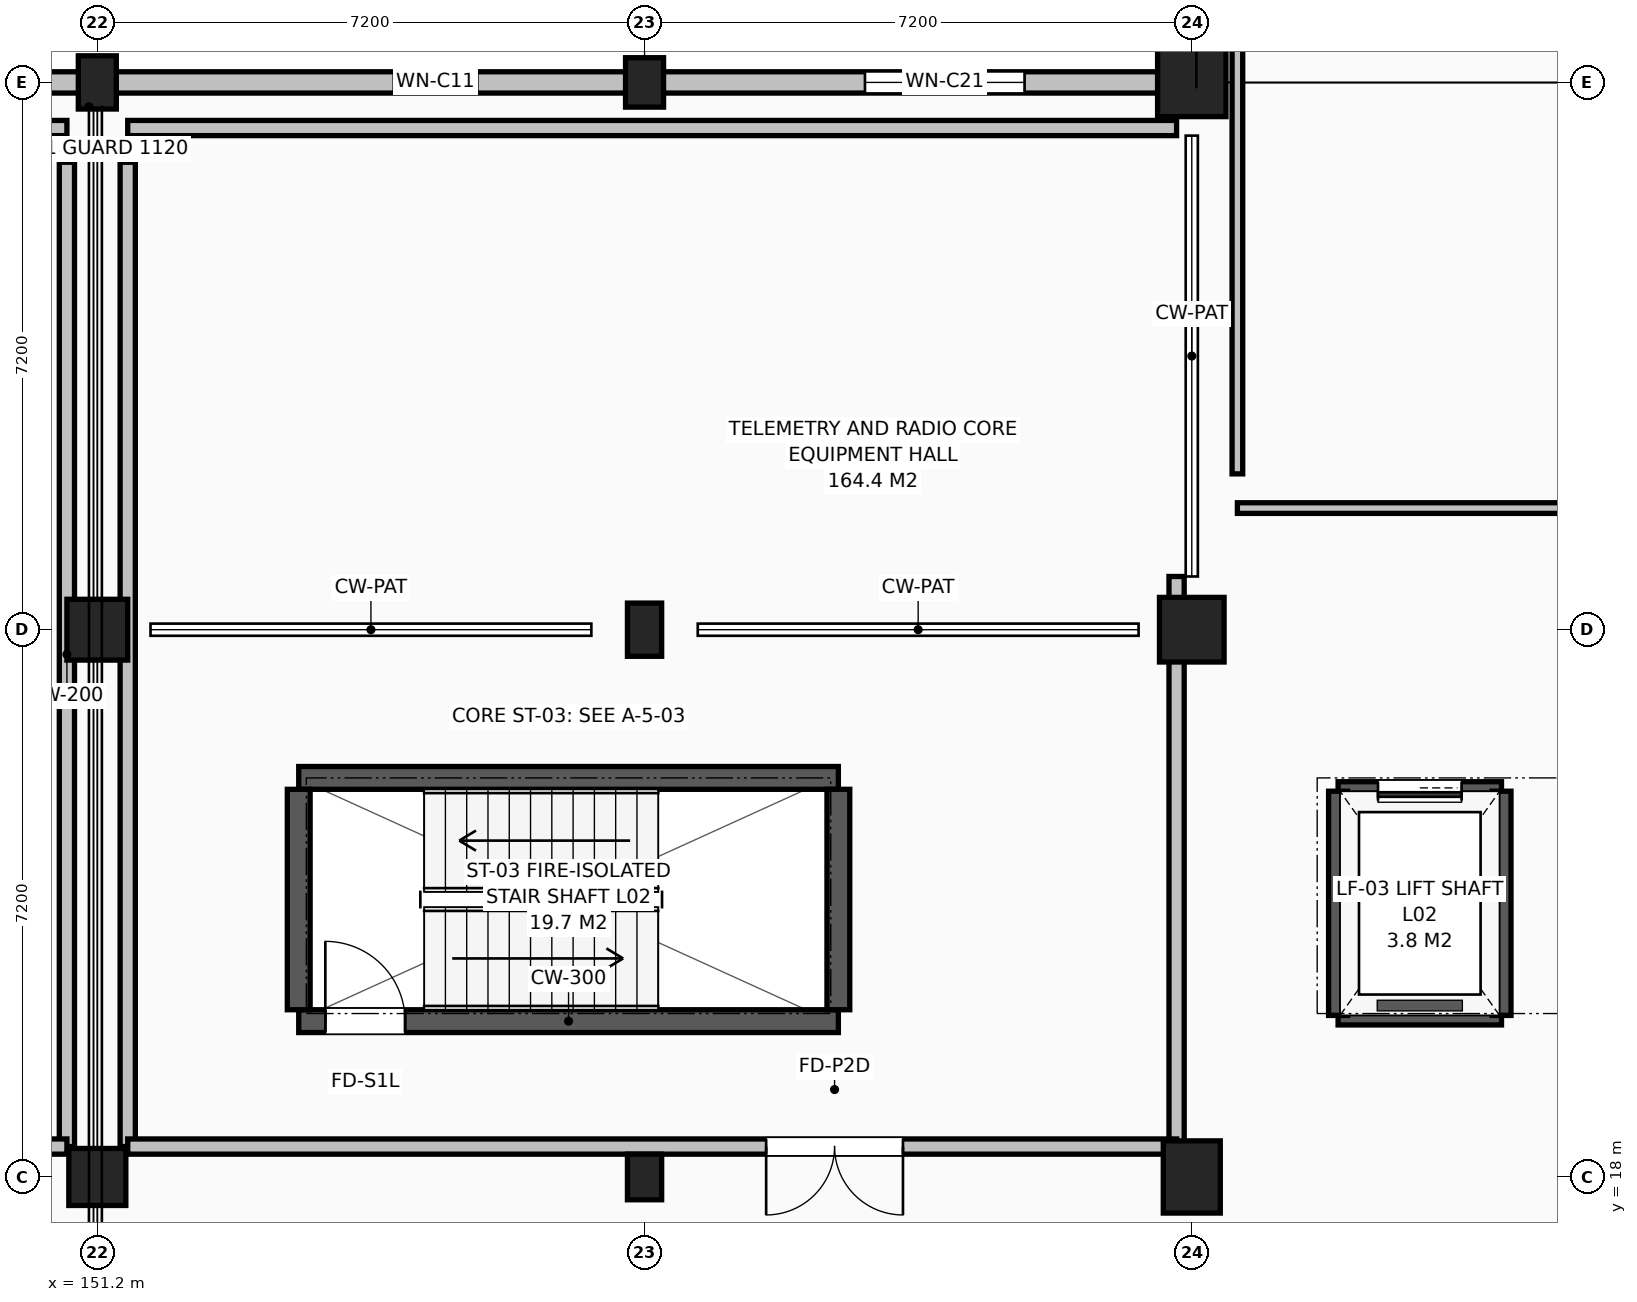
"""IFC4 building model, lengths in metres.
Left out: names, types, materials, properties, quantities, classifications, styles, units other than length and angle.
Written with IfcOpenShell. Run it as: python <this file> out.ifc"""

import sys

from ifc_helpers import new_model, si_unit, direction, frame, frame_2d, origin, origin_2d, place, context, subcontext, project, spatial, rectangle, extrude, element, fill, save


model = new_model("IFC4")
c1 = context("Model", 3, precision=1e-05, world=origin(), true_north=direction((0.0, 1.0)))
c2 = subcontext(c1, "Body", "Model", "MODEL_VIEW")
j1 = project(units=[si_unit("LENGTHUNIT", "METRE"), si_unit("PLANEANGLEUNIT", "RADIAN")], contexts=[c1])
p1 = place(None, origin())
s1 = spatial("IfcSite", under=j1, at=p1, CompositionType="ELEMENT")
p2 = place(p1, origin())
s2 = spatial("IfcBuilding", under=s1, at=p2, CompositionType="ELEMENT")
p3 = place(p2, frame((0.0, 0.0, 9.0)))
s3 = spatial("IfcBuildingStorey", under=s2, at=p3, CompositionType="ELEMENT", Elevation=9.0)
p4 = place(p3, frame((151.2, 18.0, 0.0), z_axis=(0.0, 0.0, 1.0), x_axis=(1.0, 0.0, 0.0)))
e1 = element("IfcColumn", 1, at=p4, inside=s3, PredefinedType="COLUMN", context=c2, shape_type="SweptSolid", body=[
    extrude(rectangle(XDim=0.75, YDim=0.75, at=origin_2d()), origin(), (0.0, 0.0, 1.0), 4.2),
])
p5 = place(p3, frame((151.2, 25.2, 0.0), z_axis=(0.0, 0.0, 1.0), x_axis=(1.0, 0.0, 0.0)))
e2 = element("IfcColumn", 2, at=p5, inside=s3, PredefinedType="COLUMN", context=c2, shape_type="SweptSolid", body=[
    extrude(rectangle(XDim=0.8, YDim=0.8, at=origin_2d()), origin(), (0.0, 0.0, 1.0), 4.2),
])
p6 = place(p3, frame((151.2, 32.4, 0.0), z_axis=(0.0, 0.0, 1.0), x_axis=(1.0, 0.0, 0.0)))
e3 = element("IfcColumn", 3, at=p6, inside=s3, PredefinedType="COLUMN", context=c2, shape_type="SweptSolid", body=[
    extrude(rectangle(XDim=0.5, YDim=0.7, at=origin_2d()), origin(), (0.0, 0.0, 1.0), 4.2),
])
p7 = place(p3, frame((158.4, 18.0, 0.0), z_axis=(0.0, 0.0, 1.0), x_axis=(1.0, 0.0, 0.0)))
e4 = element("IfcColumn", 4, at=p7, inside=s3, PredefinedType="COLUMN", context=c2, shape_type="SweptSolid", body=[
    extrude(rectangle(XDim=0.45, YDim=0.6, at=origin_2d()), origin(), (0.0, 0.0, 1.0), 4.2),
])
p8 = place(p3, frame((158.4, 25.2, 0.0), z_axis=(0.0, 0.0, 1.0), x_axis=(1.0, 0.0, 0.0)))
e5 = element("IfcColumn", 5, at=p8, inside=s3, PredefinedType="COLUMN", context=c2, shape_type="SweptSolid", body=[
    extrude(rectangle(XDim=0.45, YDim=0.7, at=origin_2d()), origin(), (0.0, 0.0, 1.0), 4.2),
])
p9 = place(p3, frame((158.4, 32.4, 0.0), z_axis=(0.0, 0.0, 1.0), x_axis=(1.0, 0.0, 0.0)))
e6 = element("IfcColumn", 6, at=p9, inside=s3, PredefinedType="COLUMN", context=c2, shape_type="SweptSolid", body=[
    extrude(rectangle(XDim=0.5, YDim=0.65, at=origin_2d()), origin(), (0.0, 0.0, 1.0), 4.2),
])
p10 = place(p3, frame((165.6, 18.0, 0.0), z_axis=(0.0, 0.0, 1.0), x_axis=(1.0, 0.0, 0.0)))
e7 = element("IfcColumn", 7, at=p10, inside=s3, PredefinedType="COLUMN", context=c2, shape_type="SweptSolid", body=[
    extrude(rectangle(XDim=0.75, YDim=0.95, at=origin_2d()), origin(), (0.0, 0.0, 1.0), 4.2),
])
p11 = place(p3, frame((165.6, 25.2, 0.0), z_axis=(0.0, 0.0, 1.0), x_axis=(1.0, 0.0, 0.0)))
e8 = element("IfcColumn", 8, at=p11, inside=s3, PredefinedType="COLUMN", context=c2, shape_type="SweptSolid", body=[
    extrude(rectangle(XDim=0.85, YDim=0.85, at=origin_2d()), origin(), (0.0, 0.0, 1.0), 4.2),
])
p12 = place(p3, frame((165.6, 32.4, 0.0), z_axis=(0.0, 0.0, 1.0), x_axis=(1.0, 0.0, 0.0)))
e9 = element("IfcColumn", 9, at=p12, inside=s3, PredefinedType="COLUMN", context=c2, shape_type="SweptSolid", body=[
    extrude(rectangle(XDim=0.9, YDim=0.9, at=origin_2d()), origin(), (0.0, 0.0, 1.0), 4.2),
])
p13 = place(p3, frame((165.6, 32.4, 0.0), z_axis=(0.0, 0.0, 1.0), x_axis=(-1.0, 0.0, 0.0)))
e10 = element("IfcWall", 10, at=p13, inside=s3, PredefinedType="SOLIDWALL", context=c2, shape_type="SweptSolid", body=[
    extrude(rectangle(XDim=43.2, YDim=0.28, at=frame_2d((21.6, 0.0))), origin(), (0.0, 0.0, 1.0), 3.4),
])
p14 = place(p13, frame((2.2, 0.0, 0.78)))
e11 = element("IfcOpeningElement", 11, at=p14, cuts=e10, PredefinedType="OPENING", context=c2, shape_type="SweptSolid", body=[
    extrude(rectangle(XDim=2.1, YDim=1.8, at=frame_2d((1.05, 0.9))), frame((0.0, 0.15, 0.0), z_axis=(0.0, -1.0, 0.0), x_axis=(1.0, 0.0, 0.0)), (0.0, 0.0, 1.0), 0.3),
])
p15 = place(p13, frame((9.4, 0.0, 0.78)))
e12 = element("IfcOpeningElement", 12, at=p15, cuts=e10, PredefinedType="OPENING", context=c2, shape_type="SweptSolid", body=[
    extrude(rectangle(XDim=1.1, YDim=1.65, at=frame_2d((0.55, 0.825))), frame((0.0, 0.15, 0.0), z_axis=(0.0, -1.0, 0.0), x_axis=(1.0, 0.0, 0.0)), (0.0, 0.0, 1.0), 0.3),
])
p16 = place(p13, frame((16.6, 0.0, 0.78)))
e13 = element("IfcOpeningElement", 13, at=p16, cuts=e10, PredefinedType="OPENING", context=c2, shape_type="SweptSolid", body=[
    extrude(rectangle(XDim=1.25, YDim=1.7, at=frame_2d((0.625, 0.85))), frame((0.0, 0.15, 0.0), z_axis=(0.0, -1.0, 0.0), x_axis=(1.0, 0.0, 0.0)), (0.0, 0.0, 1.0), 0.3),
])
p17 = place(p13, frame((23.8, 0.0, 0.78)))
e14 = element("IfcOpeningElement", 14, at=p17, cuts=e10, PredefinedType="OPENING", context=c2, shape_type="SweptSolid", body=[
    extrude(rectangle(XDim=1.35, YDim=1.75, at=frame_2d((0.675, 0.875))), frame((0.0, 0.15, 0.0), z_axis=(0.0, -1.0, 0.0), x_axis=(1.0, 0.0, 0.0)), (0.0, 0.0, 1.0), 0.3),
])
p18 = place(p13, frame((31.0, 0.0, 0.78)))
e15 = element("IfcOpeningElement", 15, at=p18, cuts=e10, PredefinedType="OPENING", context=c2, shape_type="SweptSolid", body=[
    extrude(rectangle(XDim=1.5, YDim=1.75, at=frame_2d((0.75, 0.875))), frame((0.0, 0.15, 0.0), z_axis=(0.0, -1.0, 0.0), x_axis=(1.0, 0.0, 0.0)), (0.0, 0.0, 1.0), 0.3),
])
p19 = place(p3, frame((153.85, 20.05, 0.0), z_axis=(0.0, 0.0, 1.0), x_axis=(1.0, 0.0, 0.0)))
e16 = element("IfcWall", 16, at=p19, inside=s3, PredefinedType="SHEAR", context=c2, shape_type="SweptSolid", body=[
    extrude(rectangle(XDim=7.1, YDim=0.3, at=frame_2d((3.55, 0.0))), origin(), (0.0, 0.0, 1.0), 3.875),
])
p20 = place(p19, frame((0.35, 0.0, 0.0)))
e17 = element("IfcOpeningElement", 17, at=p20, cuts=e16, PredefinedType="OPENING", context=c2, shape_type="SweptSolid", body=[
    extrude(rectangle(XDim=1.05, YDim=2.15, at=frame_2d((0.525, 1.075))), frame((0.0, 0.16, 0.0), z_axis=(0.0, -1.0, 0.0), x_axis=(1.0, 0.0, 0.0)), (0.0, 0.0, 1.0), 0.32),
])
p21 = place(p3, frame((160.95, 23.25, 0.0), z_axis=(0.0, 0.0, 1.0), x_axis=(-1.0, 0.0, 0.0)))
e18 = element("IfcWall", 18, at=p21, inside=s3, PredefinedType="SHEAR", context=c2, shape_type="SweptSolid", body=[
    extrude(rectangle(XDim=7.1, YDim=0.3, at=frame_2d((3.55, 0.0))), origin(), (0.0, 0.0, 1.0), 3.875),
])
for number, where, z_axis, x_axis in (
    (19, (160.95, 20.2, 0.0), (0.0, 0.0, 1.0), (0.0, 1.0, 0.0)),
    (20, (153.85, 23.1, 0.0), (0.0, 0.0, 1.0), (0.0, -1.0, 0.0)),
):
    element("IfcWall", number, at=place(p3, frame(where, z_axis=z_axis, x_axis=x_axis)), inside=s3, PredefinedType="SHEAR", context=c2, shape_type="SweptSolid", body=[
        extrude(rectangle(XDim=2.9, YDim=0.3, at=frame_2d((1.45, 0.0))), origin(), (0.0, 0.0, 1.0), 3.875),
    ])
p22 = place(p3, frame((167.525, 20.125, 0.0), z_axis=(0.0, 0.0, 1.0), x_axis=(1.0, 0.0, 0.0)))
e21 = element("IfcWall", 21, at=p22, inside=s3, PredefinedType="SHEAR", context=c2, shape_type="SweptSolid", body=[
    extrude(rectangle(XDim=2.15, YDim=0.25, at=frame_2d((1.075, 0.0))), origin(), (0.0, 0.0, 1.0), 3.9),
])
p23 = place(p3, frame((169.675, 23.075, 0.0), z_axis=(0.0, 0.0, 1.0), x_axis=(-1.0, 0.0, 0.0)))
e22 = element("IfcWall", 22, at=p23, inside=s3, PredefinedType="SHEAR", context=c2, shape_type="SweptSolid", body=[
    extrude(rectangle(XDim=2.15, YDim=0.25, at=frame_2d((1.075, 0.0))), origin(), (0.0, 0.0, 1.0), 3.9),
])
p24 = place(p23, frame((0.525, 0.0, 0.0)))
e23 = element("IfcOpeningElement", 23, at=p24, cuts=e22, PredefinedType="OPENING", context=c2, shape_type="SweptSolid", body=[
    extrude(rectangle(XDim=1.1, YDim=2.15, at=frame_2d((0.55, 1.075))), frame((0.0, 0.135, 0.0), z_axis=(0.0, -1.0, 0.0), x_axis=(1.0, 0.0, 0.0)), (0.0, 0.0, 1.0), 0.27),
])
for number, where, z_axis, x_axis in (
    (24, (167.525, 23.075, 0.0), (0.0, 0.0, 1.0), (0.0, -1.0, 0.0)),
    (25, (169.675, 20.125, 0.0), (0.0, 0.0, 1.0), (0.0, 1.0, 0.0)),
):
    element("IfcWall", number, at=place(p3, frame(where, z_axis=z_axis, x_axis=x_axis)), inside=s3, PredefinedType="SHEAR", context=c2, shape_type="SweptSolid", body=[
        extrude(rectangle(XDim=2.95, YDim=0.25, at=frame_2d((1.475, 0.0))), origin(), (0.0, 0.0, 1.0), 3.9),
    ])
p25 = place(p3, frame((130.0, 31.8, 0.0), z_axis=(0.0, 0.0, 1.0), x_axis=(1.0, 0.0, 0.0)))
e26 = element("IfcWall", 26, at=p25, inside=s3, PredefinedType="SOLIDWALL", context=c2, shape_type="SweptSolid", body=[
    extrude(rectangle(XDim=20.8, YDim=0.2, at=frame_2d((10.4, 0.0))), origin(), (0.0, 0.0, 1.0), 3.502),
])
p26 = place(p3, frame((150.8, 18.4, 0.0), z_axis=(0.0, 0.0, 1.0), x_axis=(0.0, 1.0, 0.0)))
e27 = element("IfcWall", 27, at=p26, inside=s3, PredefinedType="SOLIDWALL", context=c2, shape_type="SweptSolid", body=[
    extrude(rectangle(XDim=12.95, YDim=0.2, at=frame_2d((6.475, 0.0))), origin(), (0.0, 0.0, 1.0), 3.207),
])
p27 = place(p3, frame((150.8, 18.4, 0.0), z_axis=(0.0, 0.0, 1.0), x_axis=(-1.0, 0.0, 0.0)))
e28 = element("IfcWall", 28, at=p27, inside=s3, PredefinedType="SOLIDWALL", context=c2, shape_type="SweptSolid", body=[
    extrude(rectangle(XDim=20.8, YDim=0.2, at=frame_2d((10.4, 0.0))), origin(), (0.0, 0.0, 1.0), 3.107),
])
p28 = place(p27, frame((9.5, 0.0, 0.0)))
e29 = element("IfcOpeningElement", 29, at=p28, cuts=e28, PredefinedType="OPENING", context=c2, shape_type="SweptSolid", body=[
    extrude(rectangle(XDim=1.8, YDim=2.2, at=frame_2d((0.9, 1.1))), frame((0.0, 0.11, 0.0), z_axis=(0.0, -1.0, 0.0), x_axis=(1.0, 0.0, 0.0)), (0.0, 0.0, 1.0), 0.22),
])
p29 = place(p3, frame((151.6, 31.8, 0.0), z_axis=(0.0, 0.0, 1.0), x_axis=(1.0, 0.0, 0.0)))
e30 = element("IfcWall", 30, at=p29, inside=s3, PredefinedType="SOLIDWALL", context=c2, shape_type="SweptSolid", body=[
    extrude(rectangle(XDim=13.8, YDim=0.2, at=frame_2d((6.9, 0.0))), origin(), (0.0, 0.0, 1.0), 3.007),
])
p30 = place(p3, frame((165.4, 18.4, 0.0), z_axis=(0.0, 0.0, 1.0), x_axis=(0.0, 1.0, 0.0)))
e31 = element("IfcWall", 31, at=p30, inside=s3, PredefinedType="SOLIDWALL", context=c2, shape_type="SweptSolid", body=[
    extrude(rectangle(XDim=7.5, YDim=0.2, at=frame_2d((3.75, 0.0))), origin(), (0.0, 0.0, 1.0), 3.502),
])
p31 = place(p3, frame((151.6, 31.35, 0.0), z_axis=(0.0, 0.0, 1.0), x_axis=(0.0, -1.0, 0.0)))
e32 = element("IfcWall", 32, at=p31, inside=s3, PredefinedType="SOLIDWALL", context=c2, shape_type="SweptSolid", body=[
    extrude(rectangle(XDim=12.95, YDim=0.2, at=frame_2d((6.475, 0.0))), origin(), (0.0, 0.0, 1.0), 3.257),
])
p32 = place(p3, frame((165.4, 18.4, 0.0), z_axis=(0.0, 0.0, 1.0), x_axis=(-1.0, 0.0, 0.0)))
e33 = element("IfcWall", 33, at=p32, inside=s3, PredefinedType="SOLIDWALL", context=c2, shape_type="SweptSolid", body=[
    extrude(rectangle(XDim=13.8, YDim=0.2, at=frame_2d((6.9, 0.0))), origin(), (0.0, 0.0, 1.0), 3.057),
])
p33 = place(p32, frame((3.6, 0.0, 0.0)))
e34 = element("IfcOpeningElement", 34, at=p33, cuts=e33, PredefinedType="OPENING", context=c2, shape_type="SweptSolid", body=[
    extrude(rectangle(XDim=1.8, YDim=2.2, at=frame_2d((0.9, 1.1))), frame((0.0, 0.11, 0.0), z_axis=(0.0, -1.0, 0.0), x_axis=(1.0, 0.0, 0.0)), (0.0, 0.0, 1.0), 0.22),
])
p34 = place(p3, frame((171.8, 26.8, 0.0), z_axis=(0.0, 0.0, 1.0), x_axis=(-1.0, 0.0, 0.0)))
e35 = element("IfcWall", 35, at=p34, inside=s3, PredefinedType="PARTITIONING", context=c2, shape_type="SweptSolid", body=[
    extrude(rectangle(XDim=5.6, YDim=0.14, at=frame_2d((2.8, 0.0))), origin(), (0.0, 0.0, 1.0), 3.5),
])
p35 = place(p3, frame((166.2, 36.35, 0.0), z_axis=(0.0, 0.0, 1.0), x_axis=(0.0, -1.0, 0.0)))
e36 = element("IfcWall", 36, at=p35, inside=s3, PredefinedType="PARTITIONING", context=c2, shape_type="SweptSolid", body=[
    extrude(rectangle(XDim=9.1, YDim=0.14, at=frame_2d((4.55, 0.0))), origin(), (0.0, 0.0, 1.0), 3.5),
])
p36 = place(p14, origin())
e37 = element("IfcWindow", 37, at=p36, inside=s3, PartitioningType="SINGLE_PANEL", PredefinedType="WINDOW", context=c2, shape_type="SweptSolid", body=[
    extrude(rectangle(XDim=2.1, YDim=1.8, at=frame_2d((1.05, 0.9))), frame((0.0, 0.03, 0.0), z_axis=(0.0, -1.0, 0.0), x_axis=(1.0, 0.0, 0.0)), (0.0, 0.0, 1.0), 0.06),
])
fill(e11, e37)
p37 = place(p15, origin())
e38 = element("IfcWindow", 38, at=p37, inside=s3, PartitioningType="SINGLE_PANEL", PredefinedType="WINDOW", context=c2, shape_type="SweptSolid", body=[
    extrude(rectangle(XDim=1.1, YDim=1.65, at=frame_2d((0.55, 0.825))), frame((0.0, 0.03, 0.0), z_axis=(0.0, -1.0, 0.0), x_axis=(1.0, 0.0, 0.0)), (0.0, 0.0, 1.0), 0.06),
])
fill(e12, e38)
p38 = place(p20, origin())
e39 = element("IfcDoor", 39, at=p38, inside=s3, OperationType="SINGLE_SWING_LEFT", PredefinedType="DOOR", context=c2, shape_type="SweptSolid", body=[
    extrude(rectangle(XDim=1.05, YDim=2.15, at=frame_2d((0.525, 1.075))), frame((0.0, 0.025, 0.0), z_axis=(0.0, -1.0, 0.0), x_axis=(1.0, 0.0, 0.0)), (0.0, 0.0, 1.0), 0.05),
])
fill(e17, e39)
p39 = place(p24, origin())
e40 = element("IfcDoor", 40, at=p39, inside=s3, OperationType="SLIDING_TO_LEFT", PredefinedType="DOOR", context=c2, shape_type="SweptSolid", body=[
    extrude(rectangle(XDim=1.1, YDim=2.15, at=frame_2d((0.55, 1.075))), frame((0.0, 0.025, 0.0), z_axis=(0.0, -1.0, 0.0), x_axis=(1.0, 0.0, 0.0)), (0.0, 0.0, 1.0), 0.05),
])
fill(e23, e40)
p40 = place(p33, origin())
e41 = element("IfcDoor", 41, at=p40, inside=s3, OperationType="DOUBLE_SWING_LEFT", PredefinedType="DOOR", context=c2, shape_type="SweptSolid", body=[
    extrude(rectangle(XDim=1.8, YDim=2.2, at=frame_2d((0.9, 1.1))), frame((0.0, 0.025, 0.0), z_axis=(0.0, -1.0, 0.0), x_axis=(1.0, 0.0, 0.0)), (0.0, 0.0, 1.0), 0.05),
])
fill(e34, e41)
save(model, sys.argv[1])
